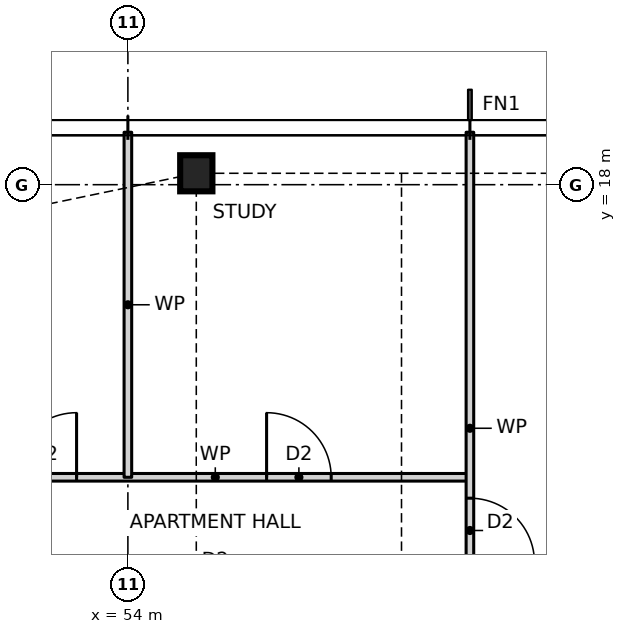
"""IFC4 building model, lengths in metres.
Left out: names, types, materials, properties, quantities, classifications, styles, units other than length and angle.
Written with IfcOpenShell. Run it as: python <this file> out.ifc"""

import sys

from ifc_helpers import new_model, si_unit, direction, frame, frame_2d, origin, origin_2d, place, context, subcontext, project, spatial, rectangle, i_section, extrude, element, fill, save


model = new_model("IFC4")
c1 = context("Model", 3, precision=1e-05, world=origin(), true_north=direction((0.0, 1.0)))
c2 = subcontext(c1, "Body", "Model", "MODEL_VIEW")
j1 = project(units=[si_unit("LENGTHUNIT", "METRE"), si_unit("PLANEANGLEUNIT", "RADIAN")], contexts=[c1])
p1 = place(None, origin())
s1 = spatial("IfcSite", under=j1, at=p1, CompositionType="ELEMENT")
p2 = place(p1, origin())
s2 = spatial("IfcBuilding", under=s1, at=p2, CompositionType="ELEMENT")
p3 = place(p2, frame((0.0, 0.0, 36.0)))
s3 = spatial("IfcBuildingStorey", under=s2, at=p3, CompositionType="ELEMENT", Elevation=36.0)
p4 = place(p3, frame((54.9, 18.15, 0.0), z_axis=(0.0, 0.0, 1.0), x_axis=(1.0, 0.0, 0.0)))
e1 = element("IfcColumn", 1, at=p4, inside=s3, PredefinedType="COLUMN", context=c2, shape_type="SweptSolid", body=[
    extrude(i_section(OverallWidth=0.424, OverallDepth=0.475, WebThickness=0.048, FlangeThickness=0.077, at=origin_2d()), origin(), (0.0, 0.0, 1.0), 3.5),
])
p5 = place(p3, frame((51.8, 14.15, 0.0), z_axis=(0.0, 0.0, 1.0), x_axis=(1.0, 0.0, 0.0)))
e2 = element("IfcWall", 2, at=p5, inside=s3, PredefinedType="PARTITIONING", context=c2, shape_type="SweptSolid", body=[
    extrude(rectangle(XDim=6.7, YDim=0.1, at=frame_2d((3.35, 0.0))), origin(), (0.0, 0.0, 1.0), 3.27),
])
p6 = place(p5, frame((4.025, 0.0, 0.0)))
e3 = element("IfcOpeningElement", 3, at=p6, cuts=e2, PredefinedType="OPENING", context=c2, shape_type="SweptSolid", body=[
    extrude(rectangle(XDim=0.85, YDim=2.1, at=frame_2d((0.425, 1.05))), frame((0.0, 0.06, 0.0), z_axis=(0.0, -1.0, 0.0), x_axis=(1.0, 0.0, 0.0)), (0.0, 0.0, 1.0), 0.12),
])
p7 = place(p5, frame((0.675, 0.0, 0.0)))
e4 = element("IfcOpeningElement", 4, at=p7, cuts=e2, PredefinedType="OPENING", context=c2, shape_type="SweptSolid", body=[
    extrude(rectangle(XDim=0.85, YDim=2.1, at=frame_2d((0.425, 1.05))), frame((0.0, 0.06, 0.0), z_axis=(0.0, -1.0, 0.0), x_axis=(1.0, 0.0, 0.0)), (0.0, 0.0, 1.0), 0.12),
])
p8 = place(p3, frame((58.5, 10.9, 0.0), z_axis=(0.0, 0.0, 1.0), x_axis=(0.0, 1.0, 0.0)))
e5 = element("IfcWall", 5, at=p8, inside=s3, PredefinedType="PARTITIONING", context=c2, shape_type="SweptSolid", body=[
    extrude(rectangle(XDim=7.79, YDim=0.1, at=frame_2d((3.895, 0.0))), origin(), (0.0, 0.0, 1.0), 3.27),
])
p9 = place(p8, frame((2.125, 0.0, 0.0)))
e6 = element("IfcOpeningElement", 6, at=p9, cuts=e5, PredefinedType="OPENING", context=c2, shape_type="SweptSolid", body=[
    extrude(rectangle(XDim=0.85, YDim=2.1, at=frame_2d((0.425, 1.05))), frame((0.0, 0.06, 0.0), z_axis=(0.0, -1.0, 0.0), x_axis=(1.0, 0.0, 0.0)), (0.0, 0.0, 1.0), 0.12),
])
p10 = place(p3, frame((54.0, 14.15, 0.0), z_axis=(0.0, 0.0, 1.0), x_axis=(0.0, 1.0, 0.0)))
e7 = element("IfcWall", 7, at=p10, inside=s3, PredefinedType="PARTITIONING", context=c2, shape_type="SweptSolid", body=[
    extrude(rectangle(XDim=4.54, YDim=0.1, at=frame_2d((2.27, 0.0))), origin(), (0.0, 0.0, 1.0), 3.27),
])
p11 = place(p9, frame((0.85, 0.0, 0.0), z_axis=(0.0, 0.0, 1.0), x_axis=(-1.0, 0.0, 0.0)))
e8 = element("IfcDoor", 8, at=p11, inside=s3, OperationType="SINGLE_SWING_RIGHT", PredefinedType="DOOR", context=c2, shape_type="SweptSolid", body=[
    extrude(rectangle(XDim=0.85, YDim=2.1, at=frame_2d((0.425, 1.05))), frame((0.0, 0.025, 0.0), z_axis=(0.0, -1.0, 0.0), x_axis=(1.0, 0.0, 0.0)), (0.0, 0.0, 1.0), 0.05),
])
fill(e6, e8)
p12 = place(p6, origin())
e9 = element("IfcDoor", 9, at=p12, inside=s3, OperationType="SINGLE_SWING_LEFT", PredefinedType="DOOR", context=c2, shape_type="SweptSolid", body=[
    extrude(rectangle(XDim=0.85, YDim=2.1, at=frame_2d((0.425, 1.05))), frame((0.0, 0.025, 0.0), z_axis=(0.0, -1.0, 0.0), x_axis=(1.0, 0.0, 0.0)), (0.0, 0.0, 1.0), 0.05),
])
fill(e3, e9)
p13 = place(p7, origin())
e10 = element("IfcDoor", 10, at=p13, inside=s3, OperationType="SINGLE_SWING_RIGHT", PredefinedType="DOOR", context=c2, shape_type="SweptSolid", body=[
    extrude(rectangle(XDim=0.85, YDim=2.1, at=frame_2d((0.425, 1.05))), frame((0.0, 0.025, 0.0), z_axis=(0.0, -1.0, 0.0), x_axis=(1.0, 0.0, 0.0)), (0.0, 0.0, 1.0), 0.05),
])
fill(e4, e10)
save(model, sys.argv[1])
